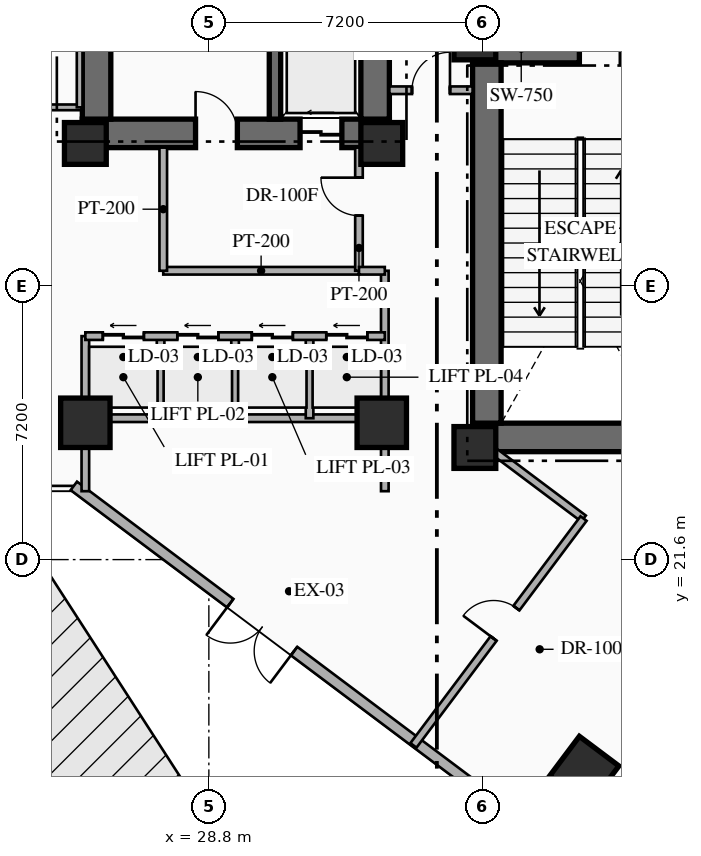
"""IFC4 building model, lengths in metres.
Left out: names, types, materials, properties, quantities, classifications, styles, units other than length and angle.
Written with IfcOpenShell. Run it as: python <this file> out.ifc"""

import sys

from ifc_helpers import new_model, si_unit, direction, frame, frame_2d, origin, origin_2d, place, context, subcontext, project, spatial, rectangle, extrude, element, fill, save


model = new_model("IFC4")
c1 = context("Model", 3, precision=1e-05, world=origin(), true_north=direction((0.0, 1.0)))
c2 = subcontext(c1, "Body", "Model", "MODEL_VIEW")
j1 = project(units=[si_unit("LENGTHUNIT", "METRE"), si_unit("PLANEANGLEUNIT", "RADIAN")], contexts=[c1])
p1 = place(None, origin())
s1 = spatial("IfcSite", under=j1, at=p1, CompositionType="ELEMENT")
p2 = place(p1, origin())
s2 = spatial("IfcBuilding", under=s1, at=p2, CompositionType="ELEMENT")
p3 = place(p2, origin())
s3 = spatial("IfcBuildingStorey", under=s2, at=p3, CompositionType="ELEMENT", Elevation=0.0)
p4 = place(p3, frame((25.47, 32.815, 0.0), z_axis=(0.0, 0.0, 1.0), x_axis=(1.0, 0.0, 0.0)))
e1 = element("IfcWall", 1, at=p4, inside=s3, PredefinedType="SHEAR", context=c2, shape_type="SweptSolid", body=[
    extrude(rectangle(XDim=8.08, YDim=0.75, at=frame_2d((4.04, 0.0))), origin(), (0.0, 0.0, 1.0), 5.4),
])
p5 = place(p4, frame((2.98, 0.0, 0.0)))
e2 = element("IfcOpeningElement", 2, at=p5, cuts=e1, PredefinedType="OPENING", context=c2, shape_type="SweptSolid", body=[
    extrude(rectangle(XDim=1.1, YDim=2.2, at=frame_2d((0.55, 1.1))), frame((0.0, 0.385, 0.0), z_axis=(0.0, -1.0, 0.0), x_axis=(1.0, 0.0, 0.0)), (0.0, 0.0, 1.0), 0.77),
])
p6 = place(p4, frame((5.73, 0.0, 0.0)))
e3 = element("IfcOpeningElement", 3, at=p6, cuts=e1, PredefinedType="OPENING", context=c2, shape_type="SweptSolid", body=[
    extrude(rectangle(XDim=1.1, YDim=2.15, at=frame_2d((0.55, 1.075))), frame((0.0, 0.385, 0.0), z_axis=(0.0, -1.0, 0.0), x_axis=(1.0, 0.0, 0.0)), (0.0, 0.0, 1.0), 0.77),
])
p7 = place(p3, frame((25.845, 33.19, 0.0), z_axis=(0.0, 0.0, 1.0), x_axis=(0.0, 1.0, 0.0)))
e4 = element("IfcWall", 4, at=p7, inside=s3, PredefinedType="SHEAR", context=c2, shape_type="SweptSolid", body=[
    extrude(rectangle(XDim=9.48, YDim=0.75, at=frame_2d((4.74, 0.0))), origin(), (0.0, 0.0, 1.0), 5.4),
])
p8 = place(p3, frame((33.175, 33.19, 0.0), z_axis=(0.0, 0.0, 1.0), x_axis=(0.0, 1.0, 0.0)))
e5 = element("IfcWall", 5, at=p8, inside=s3, PredefinedType="SHEAR", context=c2, shape_type="SweptSolid", body=[
    extrude(rectangle(XDim=9.48, YDim=0.75, at=frame_2d((4.74, 0.0))), origin(), (0.0, 0.0, 1.0), 5.4),
])
p9 = place(p8, frame((4.71, 0.0, 0.0)))
e6 = element("IfcOpeningElement", 6, at=p9, cuts=e5, PredefinedType="OPENING", context=c2, shape_type="SweptSolid", body=[
    extrude(rectangle(XDim=0.85, YDim=2.08, at=frame_2d((0.425, 1.04))), frame((0.0, 0.385, 0.0), z_axis=(0.0, -1.0, 0.0), x_axis=(1.0, 0.0, 0.0)), (0.0, 0.0, 1.0), 0.77),
])
p10 = place(p8, frame((7.76, 0.0, 0.0)))
e7 = element("IfcOpeningElement", 7, at=p10, cuts=e5, PredefinedType="OPENING", context=c2, shape_type="SweptSolid", body=[
    extrude(rectangle(XDim=0.85, YDim=2.08, at=frame_2d((0.425, 1.04))), frame((0.0, 0.385, 0.0), z_axis=(0.0, -1.0, 0.0), x_axis=(1.0, 0.0, 0.0)), (0.0, 0.0, 1.0), 0.77),
])
p11 = place(p3, frame((30.54, 33.19, 0.0), z_axis=(0.0, 0.0, 1.0), x_axis=(0.0, 1.0, 0.0)))
e8 = element("IfcWall", 8, at=p11, inside=s3, PredefinedType="SHEAR", context=c2, shape_type="SweptSolid", body=[
    extrude(rectangle(XDim=9.48, YDim=0.3, at=frame_2d((4.74, 0.0))), origin(), (0.0, 0.0, 1.0), 5.4),
])
p12 = place(p3, frame((35.74, 24.815, 0.0), z_axis=(0.0, 0.0, 1.0), x_axis=(1.0, 0.0, 0.0)))
e9 = element("IfcWall", 9, at=p12, inside=s3, PredefinedType="SHEAR", context=c2, shape_type="SweptSolid", body=[
    extrude(rectangle(XDim=8.06, YDim=0.75, at=frame_2d((4.03, 0.0))), origin(), (0.0, 0.0, 1.0), 5.4),
])
p13 = place(p3, frame((35.74, 35.045, 0.0), z_axis=(0.0, 0.0, 1.0), x_axis=(1.0, 0.0, 0.0)))
e10 = element("IfcWall", 10, at=p13, inside=s3, PredefinedType="SHEAR", context=c2, shape_type="SweptSolid", body=[
    extrude(rectangle(XDim=8.06, YDim=0.75, at=frame_2d((4.03, 0.0))), origin(), (0.0, 0.0, 1.0), 5.4),
])
p14 = place(p13, frame((2.81, 0.0, 0.0)))
e11 = element("IfcOpeningElement", 11, at=p14, cuts=e10, PredefinedType="OPENING", context=c2, shape_type="SweptSolid", body=[
    extrude(rectangle(XDim=1.1, YDim=2.2, at=frame_2d((0.55, 1.1))), frame((0.0, 0.385, 0.0), z_axis=(0.0, -1.0, 0.0), x_axis=(1.0, 0.0, 0.0)), (0.0, 0.0, 1.0), 0.77),
])
p15 = place(p13, frame((5.71, 0.0, 0.0)))
e12 = element("IfcOpeningElement", 12, at=p15, cuts=e10, PredefinedType="OPENING", context=c2, shape_type="SweptSolid", body=[
    extrude(rectangle(XDim=1.12, YDim=2.15, at=frame_2d((0.56, 1.075))), frame((0.0, 0.385, 0.0), z_axis=(0.0, -1.0, 0.0), x_axis=(1.0, 0.0, 0.0)), (0.0, 0.0, 1.0), 0.77),
])
p16 = place(p3, frame((36.115, 25.19, 0.0), z_axis=(0.0, 0.0, 1.0), x_axis=(0.0, 1.0, 0.0)))
e13 = element("IfcWall", 13, at=p16, inside=s3, PredefinedType="SHEAR", context=c2, shape_type="SweptSolid", body=[
    extrude(rectangle(XDim=9.48, YDim=0.75, at=frame_2d((4.74, 0.0))), origin(), (0.0, 0.0, 1.0), 5.4),
])
for number, where, z_axis, x_axis in (
    (14, (25.55, 32.55, 0.0), (0.0, 0.0, 1.0), (1.0, 0.0, 0.0)),
    (15, (33.35, 32.55, 0.0), (0.0, 0.0, 1.0), (1.0, 0.0, 0.0)),
    (16, (35.8, 24.55, 0.0), (0.0, 0.0, 1.0), (1.0, 0.0, 0.0)),
    (17, (35.8, 35.3, 0.0), (0.0, 0.0, 1.0), (1.0, 0.0, 0.0)),
):
    element("IfcColumn", number, at=place(p3, frame(where, z_axis=z_axis, x_axis=x_axis)), inside=s3, PredefinedType="COLUMN", context=c2, shape_type="SweptSolid", body=[
        extrude(rectangle(XDim=1.1, YDim=1.1, at=origin_2d()), origin(), (0.0, 0.0, 1.0), 5.4),
    ])
for number, where, z_axis, x_axis in (
    (18, (25.55, 25.2, 0.0), (0.0, 0.0, 1.0), (1.0, 0.0, 0.0)),
    (19, (33.35, 25.2, 0.0), (0.0, 0.0, 1.0), (1.0, 0.0, 0.0)),
    (20, (38.68, 16.04, 0.0), (0.0, 0.0, 1.0), (0.8, -0.6, 0.0)),
):
    element("IfcColumn", number, at=place(p3, frame(where, z_axis=z_axis, x_axis=x_axis)), inside=s3, PredefinedType="COLUMN", context=c2, shape_type="SweptSolid", body=[
        extrude(rectangle(XDim=1.3, YDim=1.3, at=origin_2d()), origin(), (0.0, 0.0, 1.0), 5.4),
    ])
p17 = place(p3, frame((54.518, 1.587, 0.0), z_axis=(0.0, 0.0, 1.0), x_axis=(-0.800001601415, 0.599997864774, 0.0)))
e21 = element("IfcWall", 21, at=p17, inside=s3, PredefinedType="STANDARD", context=c2, shape_type="SweptSolid", body=[
    extrude(rectangle(XDim=36.589, YDim=0.28, at=frame_2d((18.294, 0.0))), origin(), (0.0, 0.0, 1.0), 5.1),
])
p18 = place(p17, frame((6.844, 0.0, 0.0)))
e22 = element("IfcOpeningElement", 22, at=p18, cuts=e21, PredefinedType="OPENING", context=c2, shape_type="SweptSolid", body=[
    extrude(rectangle(XDim=2.1, YDim=2.3, at=frame_2d((1.05, 1.15))), frame((0.0, 0.15, 0.0), z_axis=(0.0, -1.0, 0.0), x_axis=(1.0, 0.0, 0.0)), (0.0, 0.0, 1.0), 0.3),
])
p19 = place(p17, frame((29.344, 0.0, 0.0)))
e23 = element("IfcOpeningElement", 23, at=p19, cuts=e21, PredefinedType="OPENING", context=c2, shape_type="SweptSolid", body=[
    extrude(rectangle(XDim=2.1, YDim=2.3, at=frame_2d((1.05, 1.15))), frame((0.0, 0.15, 0.0), z_axis=(0.0, -1.0, 0.0), x_axis=(1.0, 0.0, 0.0)), (0.0, 0.0, 1.0), 0.3),
])
p20 = place(p3, frame((27.6, 29.2, 0.0), z_axis=(0.0, 0.0, 1.0), x_axis=(1.0, 0.0, 0.0)))
e24 = element("IfcWall", 24, at=p20, inside=s3, PredefinedType="STANDARD", context=c2, shape_type="SweptSolid", body=[
    extrude(rectangle(XDim=5.15, YDim=0.2, at=frame_2d((2.575, 0.0))), origin(), (0.0, 0.0, 1.0), 5.1),
])
p21 = place(p3, frame((27.6, 29.2, 0.0), z_axis=(0.0, 0.0, 1.0), x_axis=(0.0, 1.0, 0.0)))
e25 = element("IfcWall", 25, at=p21, inside=s3, PredefinedType="STANDARD", context=c2, shape_type="SweptSolid", body=[
    extrude(rectangle(XDim=3.24, YDim=0.2, at=frame_2d((1.62, 0.0))), origin(), (0.0, 0.0, 1.0), 5.1),
])
p22 = place(p3, frame((32.75, 29.2, 0.0), z_axis=(0.0, 0.0, 1.0), x_axis=(0.0, 1.0, 0.0)))
e26 = element("IfcWall", 26, at=p22, inside=s3, PredefinedType="STANDARD", context=c2, shape_type="SweptSolid", body=[
    extrude(rectangle(XDim=3.24, YDim=0.2, at=frame_2d((1.62, 0.0))), origin(), (0.0, 0.0, 1.0), 5.1),
])
p23 = place(p22, frame((1.45, 0.0, 0.0)))
e27 = element("IfcOpeningElement", 27, at=p23, cuts=e26, PredefinedType="OPENING", context=c2, shape_type="SweptSolid", body=[
    extrude(rectangle(XDim=1.0, YDim=2.2, at=frame_2d((0.5, 1.1))), frame((0.0, 0.11, 0.0), z_axis=(0.0, -1.0, 0.0), x_axis=(1.0, 0.0, 0.0)), (0.0, 0.0, 1.0), 0.22),
])
p24 = place(p3, frame((25.55, 23.4, 0.0), z_axis=(0.0, 0.0, 1.0), x_axis=(0.0, 1.0, 0.0)))
e28 = element("IfcWall", 28, at=p24, inside=s3, PredefinedType="STANDARD", context=c2, shape_type="SweptSolid", body=[
    extrude(rectangle(XDim=4.08, YDim=0.2, at=frame_2d((2.04, 0.0))), origin(), (0.0, 0.0, 1.0), 3.895),
])
p25 = place(p3, frame((33.43, 23.4, 0.0), z_axis=(0.0, 0.0, 1.0), x_axis=(0.0, 1.0, 0.0)))
e29 = element("IfcWall", 29, at=p25, inside=s3, PredefinedType="STANDARD", context=c2, shape_type="SweptSolid", body=[
    extrude(rectangle(XDim=5.8, YDim=0.2, at=frame_2d((2.9, 0.0))), origin(), (0.0, 0.0, 1.0), 3.895),
])
p26 = place(p3, frame((25.55, 25.32, 0.0), z_axis=(0.0, 0.0, 1.0), x_axis=(1.0, 0.0, 0.0)))
e30 = element("IfcWall", 30, at=p26, inside=s3, PredefinedType="STANDARD", context=c2, shape_type="SweptSolid", body=[
    extrude(rectangle(XDim=7.88, YDim=0.2, at=frame_2d((3.94, 0.0))), origin(), (0.0, 0.0, 1.0), 4.495),
])
for number, where, z_axis, x_axis in (
    (31, (27.53, 25.32, 0.0), (0.0, 0.0, 1.0), (0.0, 1.0, 0.0)),
    (32, (29.49, 25.32, 0.0), (0.0, 0.0, 1.0), (0.0, 1.0, 0.0)),
    (33, (31.45, 25.32, 0.0), (0.0, 0.0, 1.0), (0.0, 1.0, 0.0)),
):
    element("IfcWall", number, at=place(p3, frame(where, z_axis=z_axis, x_axis=x_axis)), inside=s3, PredefinedType="STANDARD", context=c2, shape_type="SweptSolid", body=[
        extrude(rectangle(XDim=2.16, YDim=0.2, at=frame_2d((1.08, 0.0))), origin(), (0.0, 0.0, 1.0), 5.1),
    ])
p27 = place(p3, frame((25.55, 27.48, 0.0), z_axis=(0.0, 0.0, 1.0), x_axis=(1.0, 0.0, 0.0)))
e34 = element("IfcWall", 34, at=p27, inside=s3, PredefinedType="STANDARD", context=c2, shape_type="SweptSolid", body=[
    extrude(rectangle(XDim=7.88, YDim=0.2, at=frame_2d((3.94, 0.0))), origin(), (0.0, 0.0, 1.0), 5.1),
])
p28 = place(p27, frame((0.46, 0.0, 0.0)))
e35 = element("IfcOpeningElement", 35, at=p28, cuts=e34, PredefinedType="OPENING", context=c2, shape_type="SweptSolid", body=[
    extrude(rectangle(XDim=1.08, YDim=2.15, at=frame_2d((0.54, 1.075))), frame((0.0, 0.11, 0.0), z_axis=(0.0, -1.0, 0.0), x_axis=(1.0, 0.0, 0.0)), (0.0, 0.0, 1.0), 0.22),
])
p29 = place(p27, frame((2.42, 0.0, 0.0)))
e36 = element("IfcOpeningElement", 36, at=p29, cuts=e34, PredefinedType="OPENING", context=c2, shape_type="SweptSolid", body=[
    extrude(rectangle(XDim=1.08, YDim=2.15, at=frame_2d((0.54, 1.075))), frame((0.0, 0.11, 0.0), z_axis=(0.0, -1.0, 0.0), x_axis=(1.0, 0.0, 0.0)), (0.0, 0.0, 1.0), 0.22),
])
p30 = place(p27, frame((4.38, 0.0, 0.0)))
e37 = element("IfcOpeningElement", 37, at=p30, cuts=e34, PredefinedType="OPENING", context=c2, shape_type="SweptSolid", body=[
    extrude(rectangle(XDim=1.08, YDim=2.15, at=frame_2d((0.54, 1.075))), frame((0.0, 0.11, 0.0), z_axis=(0.0, -1.0, 0.0), x_axis=(1.0, 0.0, 0.0)), (0.0, 0.0, 1.0), 0.22),
])
p31 = place(p27, frame((6.34, 0.0, 0.0)))
e38 = element("IfcOpeningElement", 38, at=p31, cuts=e34, PredefinedType="OPENING", context=c2, shape_type="SweptSolid", body=[
    extrude(rectangle(XDim=1.08, YDim=2.15, at=frame_2d((0.54, 1.075))), frame((0.0, 0.11, 0.0), z_axis=(0.0, -1.0, 0.0), x_axis=(1.0, 0.0, 0.0)), (0.0, 0.0, 1.0), 0.22),
])
p32 = place(p3, frame((22.15, 33.5, 0.0), z_axis=(0.0, 0.0, 1.0), x_axis=(1.0, 0.0, 0.0)))
e39 = element("IfcWall", 39, at=p32, inside=s3, PredefinedType="PARTITIONING", context=c2, shape_type="SweptSolid", body=[
    extrude(rectangle(XDim=3.3, YDim=0.15, at=frame_2d((1.65, 0.0))), origin(), (0.0, 0.0, 1.0), 5.1),
])
p33 = place(p3, frame((25.4, 33.5, 0.0), z_axis=(0.0, 0.0, 1.0), x_axis=(0.0, 1.0, 0.0)))
e40 = element("IfcWall", 40, at=p33, inside=s3, PredefinedType="PARTITIONING", context=c2, shape_type="SweptSolid", body=[
    extrude(rectangle(XDim=6.6, YDim=0.15, at=frame_2d((3.3, 0.0))), origin(), (0.0, 0.0, 1.0), 5.1),
])
p34 = place(p3, frame((33.55, 33.95, 0.0), z_axis=(0.0, 0.0, 1.0), x_axis=(1.0, 0.0, 0.0)))
e41 = element("IfcWall", 41, at=p34, inside=s3, PredefinedType="STANDARD", context=c2, shape_type="SweptSolid", body=[
    extrude(rectangle(XDim=2.19, YDim=0.2, at=frame_2d((1.095, 0.0))), origin(), (0.0, 0.0, 1.0), 5.1),
])
p35 = place(p34, frame((0.595, 0.0, 0.0)))
e42 = element("IfcOpeningElement", 42, at=p35, cuts=e41, PredefinedType="OPENING", context=c2, shape_type="SweptSolid", body=[
    extrude(rectangle(XDim=1.0, YDim=2.2, at=frame_2d((0.5, 1.1))), frame((0.0, 0.11, 0.0), z_axis=(0.0, -1.0, 0.0), x_axis=(1.0, 0.0, 0.0)), (0.0, 0.0, 1.0), 0.22),
])
p36 = place(p3, frame((32.75, 29.2, 0.0), z_axis=(0.0, 0.0, 1.0), x_axis=(1.0, 0.0, 0.0)))
e43 = element("IfcWall", 43, at=p36, inside=s3, PredefinedType="STANDARD", context=c2, shape_type="SweptSolid", body=[
    extrude(rectangle(XDim=0.68, YDim=0.2, at=frame_2d((0.34, 0.0))), origin(), (0.0, 0.0, 1.0), 5.1),
])
p37 = place(p3, frame((36.287, 24.46, 0.0), z_axis=(0.0, 0.0, 1.0), x_axis=(0.799930857749, -0.600092178603, 0.0)))
e44 = element("IfcWall", 44, at=p37, inside=s3, PredefinedType="STANDARD", context=c2, shape_type="SweptSolid", body=[
    extrude(rectangle(XDim=2.966, YDim=0.2, at=frame_2d((1.483, 0.0))), origin(), (0.0, 0.0, 1.0), 5.1),
])
p38 = place(p3, frame((34.184, 16.712, 0.0), z_axis=(0.0, 0.0, 1.0), x_axis=(0.599984290919, 0.80001178157, 0.0)))
e45 = element("IfcWall", 45, at=p38, inside=s3, PredefinedType="STANDARD", context=c2, shape_type="SweptSolid", body=[
    extrude(rectangle(XDim=7.46, YDim=0.2, at=frame_2d((3.73, 0.0))), origin(), (0.0, 0.0, 1.0), 5.1),
])
p39 = place(p38, frame((3.515, 0.0, 0.0)))
e46 = element("IfcOpeningElement", 46, at=p39, cuts=e45, PredefinedType="OPENING", context=c2, shape_type="SweptSolid", body=[
    extrude(rectangle(XDim=1.0, YDim=2.2, at=frame_2d((0.5, 1.1))), frame((0.0, 0.11, 0.0), z_axis=(0.0, -1.0, 0.0), x_axis=(1.0, 0.0, 0.0)), (0.0, 0.0, 1.0), 0.22),
])
p40 = place(p3, frame((39.464, 12.752, 0.0), z_axis=(0.0, 0.0, 1.0), x_axis=(0.6, 0.8, 0.0)))
e47 = element("IfcWall", 47, at=p40, inside=s3, PredefinedType="PARTITIONING", context=c2, shape_type="SweptSolid", body=[
    extrude(rectangle(XDim=12.76, YDim=0.15, at=frame_2d((6.38, 0.0))), origin(), (0.0, 0.0, 1.0), 5.1),
])
p41 = place(p40, frame((5.68, 0.0, 0.0)))
e48 = element("IfcOpeningElement", 48, at=p41, cuts=e47, PredefinedType="OPENING", context=c2, shape_type="SweptSolid", body=[
    extrude(rectangle(XDim=1.4, YDim=2.3, at=frame_2d((0.7, 1.15))), frame((0.0, 0.085, 0.0), z_axis=(0.0, -1.0, 0.0), x_axis=(1.0, 0.0, 0.0)), (0.0, 0.0, 1.0), 0.17),
])
p42 = place(p19, origin())
e49 = element("IfcDoor", 49, at=p42, inside=s3, OperationType="DOUBLE_SWING_LEFT", PredefinedType="DOOR", context=c2, shape_type="SweptSolid", body=[
    extrude(rectangle(XDim=2.1, YDim=2.3, at=frame_2d((1.05, 1.15))), frame((0.0, 0.025, 0.0), z_axis=(0.0, -1.0, 0.0), x_axis=(1.0, 0.0, 0.0)), (0.0, 0.0, 1.0), 0.05),
])
fill(e23, e49)
p43 = place(p5, origin())
e50 = element("IfcDoor", 50, at=p43, inside=s3, OperationType="SINGLE_SWING_LEFT", PredefinedType="DOOR", context=c2, shape_type="SweptSolid", body=[
    extrude(rectangle(XDim=1.1, YDim=2.2, at=frame_2d((0.55, 1.1))), frame((0.0, 0.025, 0.0), z_axis=(0.0, -1.0, 0.0), x_axis=(1.0, 0.0, 0.0)), (0.0, 0.0, 1.0), 0.05),
])
fill(e2, e50)
p44 = place(p6, origin())
e51 = element("IfcDoor", 51, at=p44, inside=s3, OperationType="SLIDING_TO_LEFT", PredefinedType="USERDEFINED", context=c2, shape_type="SweptSolid", body=[
    extrude(rectangle(XDim=1.1, YDim=2.15, at=frame_2d((0.55, 1.075))), frame((0.0, 0.025, 0.0), z_axis=(0.0, -1.0, 0.0), x_axis=(1.0, 0.0, 0.0)), (0.0, 0.0, 1.0), 0.05),
])
fill(e3, e51)
p45 = place(p23, origin())
e52 = element("IfcDoor", 52, at=p45, inside=s3, OperationType="SINGLE_SWING_RIGHT", PredefinedType="DOOR", context=c2, shape_type="SweptSolid", body=[
    extrude(rectangle(XDim=1.0, YDim=2.2, at=frame_2d((0.5, 1.1))), frame((0.0, 0.025, 0.0), z_axis=(0.0, -1.0, 0.0), x_axis=(1.0, 0.0, 0.0)), (0.0, 0.0, 1.0), 0.05),
])
fill(e27, e52)
p46 = place(p28, origin())
e53 = element("IfcDoor", 53, at=p46, inside=s3, OperationType="SLIDING_TO_LEFT", PredefinedType="USERDEFINED", context=c2, shape_type="SweptSolid", body=[
    extrude(rectangle(XDim=1.08, YDim=2.15, at=frame_2d((0.54, 1.075))), frame((0.0, 0.025, 0.0), z_axis=(0.0, -1.0, 0.0), x_axis=(1.0, 0.0, 0.0)), (0.0, 0.0, 1.0), 0.05),
])
fill(e35, e53)
p47 = place(p29, origin())
e54 = element("IfcDoor", 54, at=p47, inside=s3, OperationType="SLIDING_TO_LEFT", PredefinedType="USERDEFINED", context=c2, shape_type="SweptSolid", body=[
    extrude(rectangle(XDim=1.08, YDim=2.15, at=frame_2d((0.54, 1.075))), frame((0.0, 0.025, 0.0), z_axis=(0.0, -1.0, 0.0), x_axis=(1.0, 0.0, 0.0)), (0.0, 0.0, 1.0), 0.05),
])
fill(e36, e54)
p48 = place(p30, origin())
e55 = element("IfcDoor", 55, at=p48, inside=s3, OperationType="SLIDING_TO_LEFT", PredefinedType="USERDEFINED", context=c2, shape_type="SweptSolid", body=[
    extrude(rectangle(XDim=1.08, YDim=2.15, at=frame_2d((0.54, 1.075))), frame((0.0, 0.025, 0.0), z_axis=(0.0, -1.0, 0.0), x_axis=(1.0, 0.0, 0.0)), (0.0, 0.0, 1.0), 0.05),
])
fill(e37, e55)
p49 = place(p31, origin())
e56 = element("IfcDoor", 56, at=p49, inside=s3, OperationType="SLIDING_TO_LEFT", PredefinedType="USERDEFINED", context=c2, shape_type="SweptSolid", body=[
    extrude(rectangle(XDim=1.08, YDim=2.15, at=frame_2d((0.54, 1.075))), frame((0.0, 0.025, 0.0), z_axis=(0.0, -1.0, 0.0), x_axis=(1.0, 0.0, 0.0)), (0.0, 0.0, 1.0), 0.05),
])
fill(e38, e56)
p50 = place(p35, origin())
e57 = element("IfcDoor", 57, at=p50, inside=s3, OperationType="SINGLE_SWING_RIGHT", PredefinedType="DOOR", context=c2, shape_type="SweptSolid", body=[
    extrude(rectangle(XDim=1.0, YDim=2.2, at=frame_2d((0.5, 1.1))), frame((0.0, 0.025, 0.0), z_axis=(0.0, -1.0, 0.0), x_axis=(1.0, 0.0, 0.0)), (0.0, 0.0, 1.0), 0.05),
])
fill(e42, e57)
p51 = place(p39, origin())
e58 = element("IfcDoor", 58, at=p51, inside=s3, OperationType="SINGLE_SWING_LEFT", PredefinedType="DOOR", context=c2, shape_type="SweptSolid", body=[
    extrude(rectangle(XDim=1.0, YDim=2.2, at=frame_2d((0.5, 1.1))), frame((0.0, 0.025, 0.0), z_axis=(0.0, -1.0, 0.0), x_axis=(1.0, 0.0, 0.0)), (0.0, 0.0, 1.0), 0.05),
])
fill(e46, e58)
save(model, sys.argv[1])
